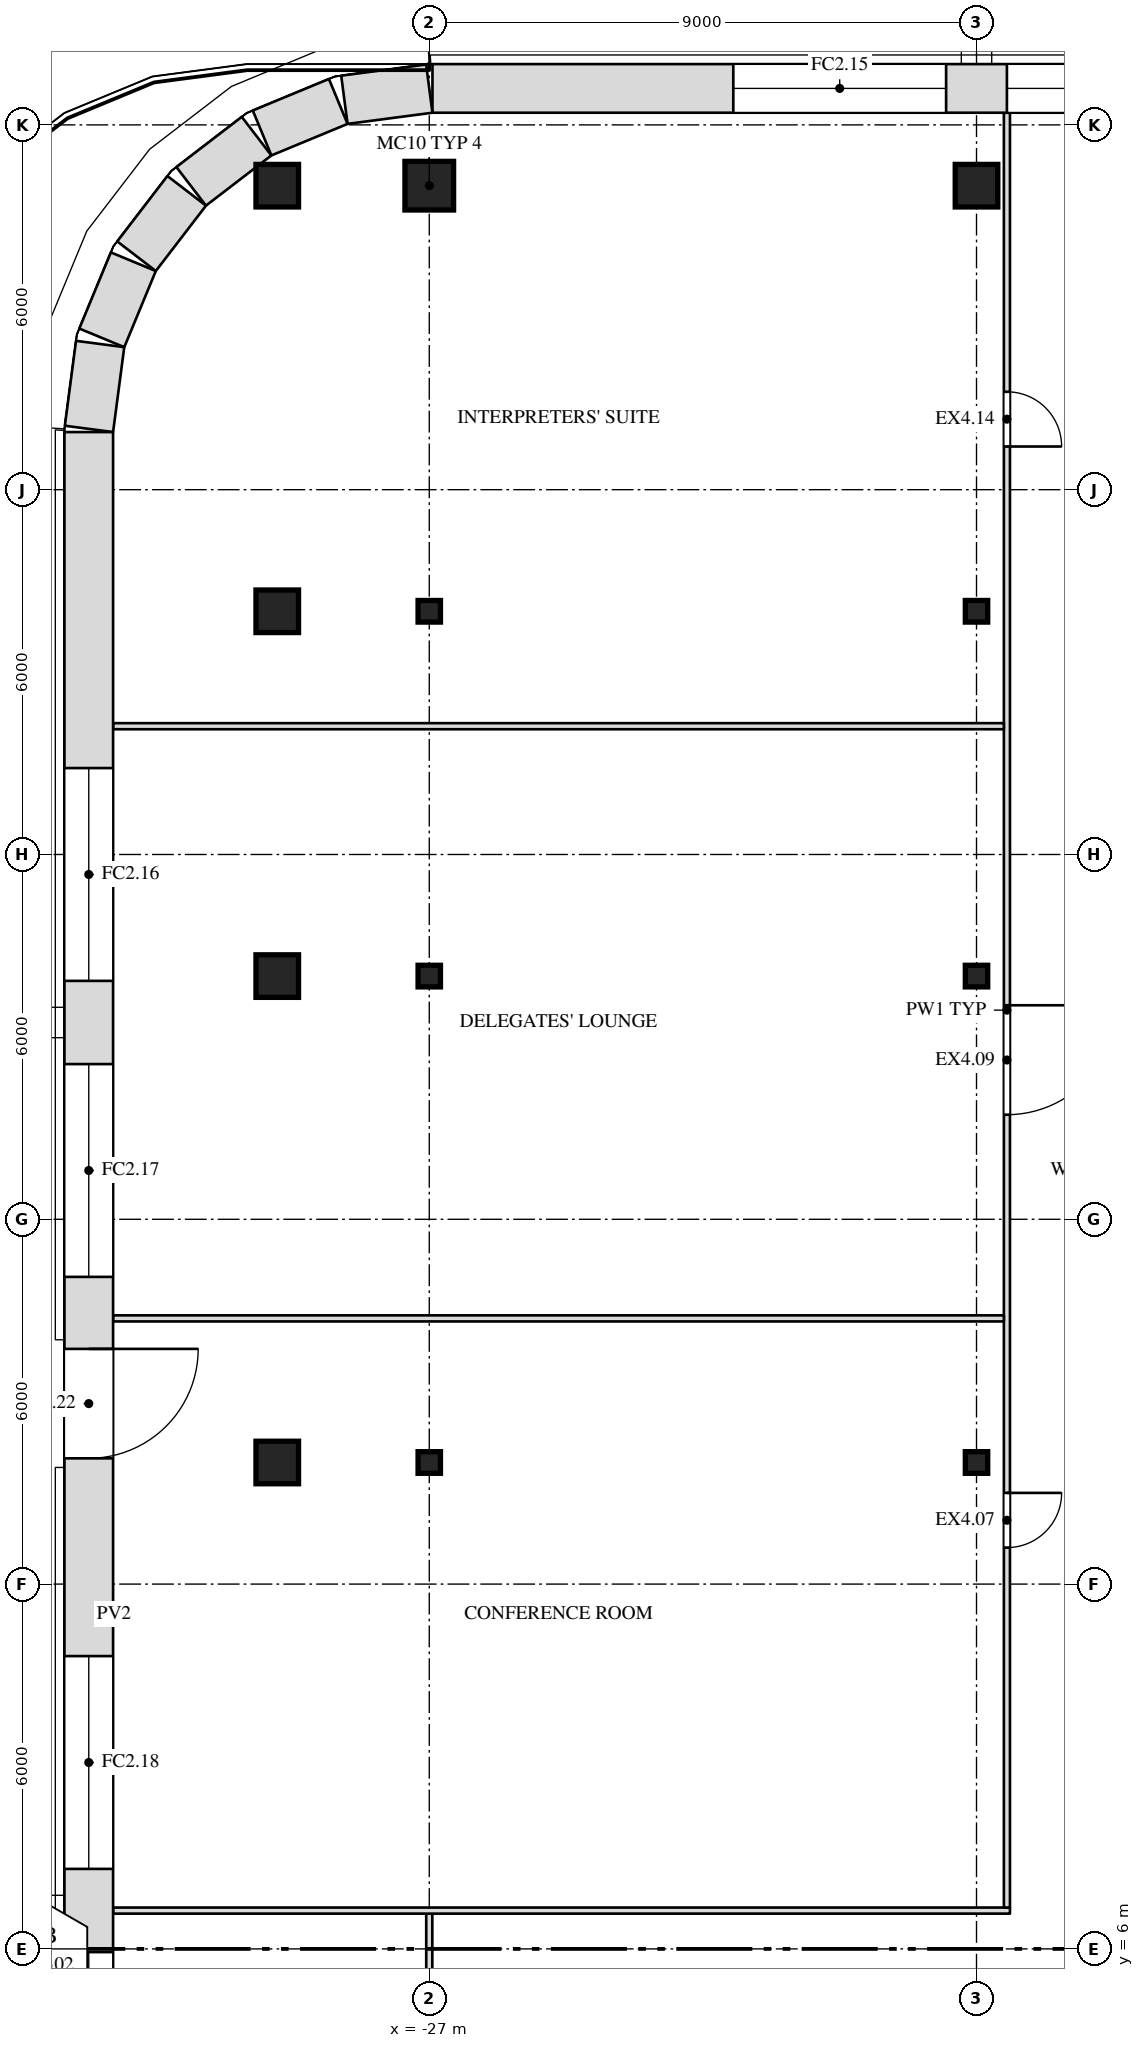
"""IFC4 building model, lengths in metres.
Left out: names, types, materials, properties, quantities, classifications, styles, units other than length and angle.
Written with IfcOpenShell. Run it as: python <this file> out.ifc"""

import sys

from ifc_helpers import new_model, si_unit, direction, frame, frame_2d, origin, origin_2d, place, context, subcontext, project, spatial, rectangle, i_section, extrude, element, fill, save


model = new_model("IFC4")
c1 = context("Model", 3, precision=1e-05, world=origin(), true_north=direction((0.0, 1.0)))
c2 = subcontext(c1, "Body", "Model", "MODEL_VIEW")
j1 = project(units=[si_unit("LENGTHUNIT", "METRE"), si_unit("PLANEANGLEUNIT", "RADIAN")], contexts=[c1])
p1 = place(None, origin())
s1 = spatial("IfcSite", under=j1, at=p1, CompositionType="ELEMENT")
p2 = place(p1, origin())
s2 = spatial("IfcBuilding", under=s1, at=p2, CompositionType="ELEMENT")
p3 = place(p2, frame((0.0, 0.0, 284.5)))
s3 = spatial("IfcBuildingStorey", under=s2, at=p3, CompositionType="ELEMENT", Elevation=284.5)
p4 = place(p3, frame((-29.5, 14.0, 0.0), z_axis=(0.0, 0.0, 1.0), x_axis=(1.0, 0.0, 0.0)))
e1 = element("IfcColumn", 1, at=p4, inside=s3, PredefinedType="COLUMN", context=c2, shape_type="SweptSolid", body=[
    extrude(rectangle(XDim=0.7, YDim=0.7, at=origin_2d()), origin(), (0.0, 0.0, 1.0), 4.0),
])
for number, where, z_axis, x_axis in (
    (2, (-27.0, 14.0, 0.0), (0.0, 0.0, 1.0), (1.0, 0.0, 0.0)),
    (3, (-18.0, 14.0, 0.0), (0.0, 0.0, 1.0), (1.0, 0.0, 0.0)),
):
    element("IfcColumn", number, at=place(p3, frame(where, z_axis=z_axis, x_axis=x_axis)), inside=s3, PredefinedType="COLUMN", context=c2, shape_type="SweptSolid", body=[
        extrude(i_section(OverallWidth=0.368, OverallDepth=0.356, WebThickness=0.011, FlangeThickness=0.018, at=origin_2d()), origin(), (0.0, 0.0, 1.0), 4.0),
    ])
p5 = place(p3, frame((-29.5, 22.0, 0.0), z_axis=(0.0, 0.0, 1.0), x_axis=(1.0, 0.0, 0.0)))
e4 = element("IfcColumn", 4, at=p5, inside=s3, PredefinedType="COLUMN", context=c2, shape_type="SweptSolid", body=[
    extrude(rectangle(XDim=0.7, YDim=0.7, at=origin_2d()), origin(), (0.0, 0.0, 1.0), 4.0),
])
for number, where, z_axis, x_axis in (
    (5, (-27.0, 22.0, 0.0), (0.0, 0.0, 1.0), (1.0, 0.0, 0.0)),
    (6, (-18.0, 22.0, 0.0), (0.0, 0.0, 1.0), (1.0, 0.0, 0.0)),
):
    element("IfcColumn", number, at=place(p3, frame(where, z_axis=z_axis, x_axis=x_axis)), inside=s3, PredefinedType="COLUMN", context=c2, shape_type="SweptSolid", body=[
        extrude(i_section(OverallWidth=0.368, OverallDepth=0.356, WebThickness=0.011, FlangeThickness=0.018, at=origin_2d()), origin(), (0.0, 0.0, 1.0), 4.0),
    ])
p6 = place(p3, frame((-29.5, 28.0, 0.0), z_axis=(0.0, 0.0, 1.0), x_axis=(1.0, 0.0, 0.0)))
e7 = element("IfcColumn", 7, at=p6, inside=s3, PredefinedType="COLUMN", context=c2, shape_type="SweptSolid", body=[
    extrude(rectangle(XDim=0.7, YDim=0.7, at=origin_2d()), origin(), (0.0, 0.0, 1.0), 4.0),
])
for number, where, z_axis, x_axis in (
    (8, (-27.0, 28.0, 0.0), (0.0, 0.0, 1.0), (1.0, 0.0, 0.0)),
    (9, (-18.0, 28.0, 0.0), (0.0, 0.0, 1.0), (1.0, 0.0, 0.0)),
):
    element("IfcColumn", number, at=place(p3, frame(where, z_axis=z_axis, x_axis=x_axis)), inside=s3, PredefinedType="COLUMN", context=c2, shape_type="SweptSolid", body=[
        extrude(i_section(OverallWidth=0.368, OverallDepth=0.356, WebThickness=0.011, FlangeThickness=0.018, at=origin_2d()), origin(), (0.0, 0.0, 1.0), 4.0),
    ])
p7 = place(p3, frame((-29.5, 35.0, 0.0), z_axis=(0.0, 0.0, 1.0), x_axis=(1.0, 0.0, 0.0)))
e10 = element("IfcColumn", 10, at=p7, inside=s3, PredefinedType="COLUMN", context=c2, shape_type="SweptSolid", body=[
    extrude(rectangle(XDim=0.7, YDim=0.7, at=origin_2d()), origin(), (0.0, 0.0, 1.0), 4.0),
])
p8 = place(p3, frame((-27.0, 35.0, 0.0), z_axis=(0.0, 0.0, 1.0), x_axis=(1.0, 0.0, 0.0)))
e11 = element("IfcColumn", 11, at=p8, inside=s3, PredefinedType="COLUMN", context=c2, shape_type="SweptSolid", body=[
    extrude(rectangle(XDim=0.8, YDim=0.8, at=origin_2d()), origin(), (0.0, 0.0, 1.0), 4.0),
])
p9 = place(p3, frame((-18.0, 35.0, 0.0), z_axis=(0.0, 0.0, 1.0), x_axis=(1.0, 0.0, 0.0)))
e12 = element("IfcColumn", 12, at=p9, inside=s3, PredefinedType="COLUMN", context=c2, shape_type="SweptSolid", body=[
    extrude(rectangle(XDim=0.7, YDim=0.7, at=origin_2d()), origin(), (0.0, 0.0, 1.0), 4.0),
])
p10 = place(p3, frame((-27.0, 4.678, 0.0), z_axis=(0.0, 0.0, 1.0), x_axis=(0.0, 1.0, 0.0)))
e13 = element("IfcWall", 13, at=p10, inside=s3, PredefinedType="PARTITIONING", context=c2, shape_type="SweptSolid", body=[
    extrude(rectangle(XDim=1.902, YDim=0.1, at=frame_2d((0.951, 0.0))), origin(), (0.0, 0.0, 1.0), 3.247),
])
p11 = place(p3, frame((-32.2, 6.63, 0.0), z_axis=(0.0, 0.0, 1.0), x_axis=(1.0, 0.0, 0.0)))
e14 = element("IfcWall", 14, at=p11, inside=s3, PredefinedType="PARTITIONING", context=c2, shape_type="SweptSolid", body=[
    extrude(rectangle(XDim=14.75, YDim=0.1, at=frame_2d((7.375, 0.0))), origin(), (0.0, 0.0, 1.0), 3.78),
])
p12 = place(p3, frame((-17.5, 6.68, 0.0), z_axis=(0.0, 0.0, 1.0), x_axis=(0.0, 1.0, 0.0)))
e15 = element("IfcWall", 15, at=p12, inside=s3, PredefinedType="PARTITIONING", context=c2, shape_type="SweptSolid", body=[
    extrude(rectangle(XDim=29.52, YDim=0.1, at=frame_2d((14.76, 0.0))), origin(), (0.0, 0.0, 1.0), 3.78),
])
p13 = place(p12, frame((5.92, 0.0, 0.0)))
e16 = element("IfcOpeningElement", 16, at=p13, cuts=e15, PredefinedType="OPENING", context=c2, shape_type="SweptSolid", body=[
    extrude(rectangle(XDim=0.9, YDim=2.1, at=frame_2d((0.45, 1.05))), frame((0.0, 0.062, 0.0), z_axis=(0.0, -1.0, 0.0), x_axis=(1.0, 0.0, 0.0)), (0.0, 0.0, 1.0), 0.124),
])
p14 = place(p12, frame((13.04, 0.0, 0.0)))
e17 = element("IfcOpeningElement", 17, at=p14, cuts=e15, PredefinedType="OPENING", context=c2, shape_type="SweptSolid", body=[
    extrude(rectangle(XDim=1.8, YDim=2.1, at=frame_2d((0.9, 1.05))), frame((0.0, 0.062, 0.0), z_axis=(0.0, -1.0, 0.0), x_axis=(1.0, 0.0, 0.0)), (0.0, 0.0, 1.0), 0.124),
])
p15 = place(p12, frame((24.03, 0.0, 0.0)))
e18 = element("IfcOpeningElement", 18, at=p15, cuts=e15, PredefinedType="OPENING", context=c2, shape_type="SweptSolid", body=[
    extrude(rectangle(XDim=0.9, YDim=2.1, at=frame_2d((0.45, 1.05))), frame((0.0, 0.062, 0.0), z_axis=(0.0, -1.0, 0.0), x_axis=(1.0, 0.0, 0.0)), (0.0, 0.0, 1.0), 0.124),
])
for number, where, z_axis, x_axis in (
    (19, (-32.2, 16.37, 0.0), (0.0, 0.0, 1.0), (1.0, 0.0, 0.0)),
    (20, (-32.2, 26.11, 0.0), (0.0, 0.0, 1.0), (1.0, 0.0, 0.0)),
):
    element("IfcWall", number, at=place(p3, frame(where, z_axis=z_axis, x_axis=x_axis)), inside=s3, PredefinedType="PARTITIONING", context=c2, shape_type="SweptSolid", body=[
        extrude(rectangle(XDim=14.65, YDim=0.1, at=frame_2d((7.325, 0.0))), origin(), (0.0, 0.0, 1.0), 3.78),
    ])
p16 = place(p3, frame((26.948, 36.6, 0.0), z_axis=(0.0, 0.0, 1.0), x_axis=(-1.0, 0.0, 0.0)))
e21 = element("IfcWall", 21, at=p16, inside=s3, PredefinedType="SOLIDWALL", context=c2, shape_type="SweptSolid", body=[
    extrude(rectangle(XDim=53.895, YDim=0.8, at=frame_2d((26.948, 0.0))), origin(), (0.0, 0.0, 1.0), 3.78),
])
p17 = place(p16, frame((4.948, 0.0, 1.0)))
e22 = element("IfcOpeningElement", 22, at=p17, cuts=e21, PredefinedType="OPENING", context=c2, shape_type="SweptSolid", body=[
    extrude(rectangle(XDim=3.5, YDim=2.5, at=frame_2d((1.75, 1.25))), frame((0.0, 0.412, 0.0), z_axis=(0.0, -1.0, 0.0), x_axis=(1.0, 0.0, 0.0)), (0.0, 0.0, 1.0), 0.824),
])
p18 = place(p16, frame((9.448, 0.0, 1.0)))
e23 = element("IfcOpeningElement", 23, at=p18, cuts=e21, PredefinedType="OPENING", context=c2, shape_type="SweptSolid", body=[
    extrude(rectangle(XDim=3.5, YDim=2.5, at=frame_2d((1.75, 1.25))), frame((0.0, 0.412, 0.0), z_axis=(0.0, -1.0, 0.0), x_axis=(1.0, 0.0, 0.0)), (0.0, 0.0, 1.0), 0.824),
])
p19 = place(p16, frame((13.948, 0.0, 1.0)))
e24 = element("IfcOpeningElement", 24, at=p19, cuts=e21, PredefinedType="OPENING", context=c2, shape_type="SweptSolid", body=[
    extrude(rectangle(XDim=3.5, YDim=2.5, at=frame_2d((1.75, 1.25))), frame((0.0, 0.412, 0.0), z_axis=(0.0, -1.0, 0.0), x_axis=(1.0, 0.0, 0.0)), (0.0, 0.0, 1.0), 0.824),
])
p20 = place(p16, frame((18.448, 0.0, 1.0)))
e25 = element("IfcOpeningElement", 25, at=p20, cuts=e21, PredefinedType="OPENING", context=c2, shape_type="SweptSolid", body=[
    extrude(rectangle(XDim=3.5, YDim=2.5, at=frame_2d((1.75, 1.25))), frame((0.0, 0.412, 0.0), z_axis=(0.0, -1.0, 0.0), x_axis=(1.0, 0.0, 0.0)), (0.0, 0.0, 1.0), 0.824),
])
p21 = place(p16, frame((22.948, 0.0, 1.0)))
e26 = element("IfcOpeningElement", 26, at=p21, cuts=e21, PredefinedType="OPENING", context=c2, shape_type="SweptSolid", body=[
    extrude(rectangle(XDim=3.5, YDim=2.5, at=frame_2d((1.75, 1.25))), frame((0.0, 0.412, 0.0), z_axis=(0.0, -1.0, 0.0), x_axis=(1.0, 0.0, 0.0)), (0.0, 0.0, 1.0), 0.824),
])
p22 = place(p16, frame((27.448, 0.0, 1.0)))
e27 = element("IfcOpeningElement", 27, at=p22, cuts=e21, PredefinedType="OPENING", context=c2, shape_type="SweptSolid", body=[
    extrude(rectangle(XDim=3.5, YDim=2.5, at=frame_2d((1.75, 1.25))), frame((0.0, 0.412, 0.0), z_axis=(0.0, -1.0, 0.0), x_axis=(1.0, 0.0, 0.0)), (0.0, 0.0, 1.0), 0.824),
])
p23 = place(p16, frame((31.948, 0.0, 1.0)))
e28 = element("IfcOpeningElement", 28, at=p23, cuts=e21, PredefinedType="OPENING", context=c2, shape_type="SweptSolid", body=[
    extrude(rectangle(XDim=3.5, YDim=2.5, at=frame_2d((1.75, 1.25))), frame((0.0, 0.412, 0.0), z_axis=(0.0, -1.0, 0.0), x_axis=(1.0, 0.0, 0.0)), (0.0, 0.0, 1.0), 0.824),
])
p24 = place(p16, frame((36.448, 0.0, 1.0)))
e29 = element("IfcOpeningElement", 29, at=p24, cuts=e21, PredefinedType="OPENING", context=c2, shape_type="SweptSolid", body=[
    extrude(rectangle(XDim=3.5, YDim=2.5, at=frame_2d((1.75, 1.25))), frame((0.0, 0.412, 0.0), z_axis=(0.0, -1.0, 0.0), x_axis=(1.0, 0.0, 0.0)), (0.0, 0.0, 1.0), 0.824),
])
p25 = place(p16, frame((40.948, 0.0, 1.0)))
e30 = element("IfcOpeningElement", 30, at=p25, cuts=e21, PredefinedType="OPENING", context=c2, shape_type="SweptSolid", body=[
    extrude(rectangle(XDim=3.5, YDim=2.5, at=frame_2d((1.75, 1.25))), frame((0.0, 0.412, 0.0), z_axis=(0.0, -1.0, 0.0), x_axis=(1.0, 0.0, 0.0)), (0.0, 0.0, 1.0), 0.824),
])
p26 = place(p16, frame((45.448, 0.0, 1.0)))
e31 = element("IfcOpeningElement", 31, at=p26, cuts=e21, PredefinedType="OPENING", context=c2, shape_type="SweptSolid", body=[
    extrude(rectangle(XDim=3.5, YDim=2.5, at=frame_2d((1.75, 1.25))), frame((0.0, 0.412, 0.0), z_axis=(0.0, -1.0, 0.0), x_axis=(1.0, 0.0, 0.0)), (0.0, 0.0, 1.0), 0.824),
])
p27 = place(p3, frame((-27.0, 36.597, 0.0), z_axis=(0.0, 0.0, 1.0), x_axis=(-0.99144603414, -0.130517283865, 0.0)))
e32 = element("IfcWall", 32, at=p27, inside=s3, PredefinedType="SOLIDWALL", context=c2, shape_type="SweptSolid", body=[
    extrude(rectangle(XDim=1.408, YDim=0.8, at=frame_2d((0.704, 0.0))), origin(), (0.0, 0.0, 1.0), 3.78),
])
p28 = place(p3, frame((-28.497, 36.386, 0.0), z_axis=(0.0, 0.0, 1.0), x_axis=(-0.923847774587, -0.38276009378, 0.0)))
e33 = element("IfcWall", 33, at=p28, inside=s3, PredefinedType="SOLIDWALL", context=c2, shape_type="SweptSolid", body=[
    extrude(rectangle(XDim=1.355, YDim=0.8, at=frame_2d((0.678, 0.0))), origin(), (0.0, 0.0, 1.0), 3.78),
])
for number, where, z_axis, x_axis in (
    (34, (-29.84, 35.815, 0.0), (0.0, 0.0, 1.0), (-0.793, -0.609, 0.0)),
    (35, (-30.989, 34.916, 0.0), (0.0, 0.0, 1.0), (-0.609, -0.793, 0.0)),
):
    element("IfcWall", number, at=place(p3, frame(where, z_axis=z_axis, x_axis=x_axis)), inside=s3, PredefinedType="SOLIDWALL", context=c2, shape_type="SweptSolid", body=[
        extrude(rectangle(XDim=1.356, YDim=0.8, at=frame_2d((0.678, 0.0))), origin(), (0.0, 0.0, 1.0), 3.78),
    ])
p29 = place(p3, frame((-31.867, 33.75, 0.0), z_axis=(0.0, 0.0, 1.0), x_axis=(-0.38276009378, -0.923847774587, 0.0)))
e36 = element("IfcWall", 36, at=p29, inside=s3, PredefinedType="SOLIDWALL", context=c2, shape_type="SweptSolid", body=[
    extrude(rectangle(XDim=1.355, YDim=0.8, at=frame_2d((0.678, 0.0))), origin(), (0.0, 0.0, 1.0), 3.78),
])
p30 = place(p3, frame((-32.413, 32.396, 0.0), z_axis=(0.0, 0.0, 1.0), x_axis=(-0.130517283865, -0.99144603414, 0.0)))
e37 = element("IfcWall", 37, at=p30, inside=s3, PredefinedType="SOLIDWALL", context=c2, shape_type="SweptSolid", body=[
    extrude(rectangle(XDim=1.408, YDim=0.8, at=frame_2d((0.704, 0.0))), origin(), (0.0, 0.0, 1.0), 3.78),
])
p31 = place(p3, frame((-32.6, 30.948, 0.0), z_axis=(0.0, 0.0, 1.0), x_axis=(0.0, -1.0, 0.0)))
e38 = element("IfcWall", 38, at=p31, inside=s3, PredefinedType="SOLIDWALL", context=c2, shape_type="SweptSolid", body=[
    extrude(rectangle(XDim=38.895, YDim=0.8, at=frame_2d((19.448, 0.0))), origin(), (0.0, 0.0, 1.0), 3.78),
])
p32 = place(p31, frame((5.526, 0.0, 1.0)))
e39 = element("IfcOpeningElement", 39, at=p32, cuts=e38, PredefinedType="OPENING", context=c2, shape_type="SweptSolid", body=[
    extrude(rectangle(XDim=3.5, YDim=2.5, at=frame_2d((1.75, 1.25))), frame((0.0, 0.412, 0.0), z_axis=(0.0, -1.0, 0.0), x_axis=(1.0, 0.0, 0.0)), (0.0, 0.0, 1.0), 0.824),
])
p33 = place(p31, frame((10.395, 0.0, 1.0)))
e40 = element("IfcOpeningElement", 40, at=p33, cuts=e38, PredefinedType="OPENING", context=c2, shape_type="SweptSolid", body=[
    extrude(rectangle(XDim=3.5, YDim=2.5, at=frame_2d((1.75, 1.25))), frame((0.0, 0.412, 0.0), z_axis=(0.0, -1.0, 0.0), x_axis=(1.0, 0.0, 0.0)), (0.0, 0.0, 1.0), 0.824),
])
p34 = place(p31, frame((20.132, 0.0, 1.0)))
e41 = element("IfcOpeningElement", 41, at=p34, cuts=e38, PredefinedType="OPENING", context=c2, shape_type="SweptSolid", body=[
    extrude(rectangle(XDim=3.5, YDim=2.5, at=frame_2d((1.75, 1.25))), frame((0.0, 0.412, 0.0), z_axis=(0.0, -1.0, 0.0), x_axis=(1.0, 0.0, 0.0)), (0.0, 0.0, 1.0), 0.824),
])
p35 = place(p31, frame((25.0, 0.0, 1.0)))
e42 = element("IfcOpeningElement", 42, at=p35, cuts=e38, PredefinedType="OPENING", context=c2, shape_type="SweptSolid", body=[
    extrude(rectangle(XDim=3.5, YDim=2.5, at=frame_2d((1.75, 1.25))), frame((0.0, 0.412, 0.0), z_axis=(0.0, -1.0, 0.0), x_axis=(1.0, 0.0, 0.0)), (0.0, 0.0, 1.0), 0.824),
])
p36 = place(p31, frame((29.869, 0.0, 1.0)))
e43 = element("IfcOpeningElement", 43, at=p36, cuts=e38, PredefinedType="OPENING", context=c2, shape_type="SweptSolid", body=[
    extrude(rectangle(XDim=3.5, YDim=2.5, at=frame_2d((1.75, 1.25))), frame((0.0, 0.412, 0.0), z_axis=(0.0, -1.0, 0.0), x_axis=(1.0, 0.0, 0.0)), (0.0, 0.0, 1.0), 0.824),
])
p37 = place(p31, frame((15.079, 0.0, 0.0)))
e44 = element("IfcOpeningElement", 44, at=p37, cuts=e38, PredefinedType="OPENING", context=c2, shape_type="SweptSolid", body=[
    extrude(rectangle(XDim=1.8, YDim=2.4, at=frame_2d((0.9, 1.2))), frame((0.0, 0.412, 0.0), z_axis=(0.0, -1.0, 0.0), x_axis=(1.0, 0.0, 0.0)), (0.0, 0.0, 1.0), 0.824),
])
p38 = place(p13, origin())
e45 = element("IfcDoor", 45, at=p38, inside=s3, OperationType="SINGLE_SWING_LEFT", PredefinedType="DOOR", context=c2, shape_type="SweptSolid", body=[
    extrude(rectangle(XDim=0.9, YDim=2.1, at=frame_2d((0.45, 1.05))), frame((0.0, 0.025, 0.0), z_axis=(0.0, -1.0, 0.0), x_axis=(1.0, 0.0, 0.0)), (0.0, 0.0, 1.0), 0.05),
])
fill(e16, e45)
p39 = place(p14, origin())
e46 = element("IfcDoor", 46, at=p39, inside=s3, OperationType="DOUBLE_DOOR_SINGLE_SWING", PredefinedType="DOOR", context=c2, shape_type="SweptSolid", body=[
    extrude(rectangle(XDim=1.8, YDim=2.1, at=frame_2d((0.9, 1.05))), frame((0.0, 0.025, 0.0), z_axis=(0.0, -1.0, 0.0), x_axis=(1.0, 0.0, 0.0)), (0.0, 0.0, 1.0), 0.05),
])
fill(e17, e46)
p40 = place(p15, origin())
e47 = element("IfcDoor", 47, at=p40, inside=s3, OperationType="SINGLE_SWING_RIGHT", PredefinedType="DOOR", context=c2, shape_type="SweptSolid", body=[
    extrude(rectangle(XDim=0.9, YDim=2.1, at=frame_2d((0.45, 1.05))), frame((0.0, 0.025, 0.0), z_axis=(0.0, -1.0, 0.0), x_axis=(1.0, 0.0, 0.0)), (0.0, 0.0, 1.0), 0.05),
])
fill(e18, e47)
p41 = place(p25, origin())
e48 = element("IfcWindow", 48, at=p41, inside=s3, PartitioningType="SINGLE_PANEL", PredefinedType="WINDOW", context=c2, shape_type="SweptSolid", body=[
    extrude(rectangle(XDim=3.5, YDim=2.5, at=frame_2d((1.75, 1.25))), frame((0.0, 0.03, 0.0), z_axis=(0.0, -1.0, 0.0), x_axis=(1.0, 0.0, 0.0)), (0.0, 0.0, 1.0), 0.06),
])
fill(e30, e48)
p42 = place(p26, origin())
e49 = element("IfcWindow", 49, at=p42, inside=s3, PartitioningType="SINGLE_PANEL", PredefinedType="WINDOW", context=c2, shape_type="SweptSolid", body=[
    extrude(rectangle(XDim=3.5, YDim=2.5, at=frame_2d((1.75, 1.25))), frame((0.0, 0.03, 0.0), z_axis=(0.0, -1.0, 0.0), x_axis=(1.0, 0.0, 0.0)), (0.0, 0.0, 1.0), 0.06),
])
fill(e31, e49)
p43 = place(p32, origin())
e50 = element("IfcWindow", 50, at=p43, inside=s3, PartitioningType="SINGLE_PANEL", PredefinedType="WINDOW", context=c2, shape_type="SweptSolid", body=[
    extrude(rectangle(XDim=3.5, YDim=2.5, at=frame_2d((1.75, 1.25))), frame((0.0, 0.03, 0.0), z_axis=(0.0, -1.0, 0.0), x_axis=(1.0, 0.0, 0.0)), (0.0, 0.0, 1.0), 0.06),
])
fill(e39, e50)
p44 = place(p33, origin())
e51 = element("IfcWindow", 51, at=p44, inside=s3, PartitioningType="SINGLE_PANEL", PredefinedType="WINDOW", context=c2, shape_type="SweptSolid", body=[
    extrude(rectangle(XDim=3.5, YDim=2.5, at=frame_2d((1.75, 1.25))), frame((0.0, 0.03, 0.0), z_axis=(0.0, -1.0, 0.0), x_axis=(1.0, 0.0, 0.0)), (0.0, 0.0, 1.0), 0.06),
])
fill(e40, e51)
p45 = place(p34, origin())
e52 = element("IfcWindow", 52, at=p45, inside=s3, PartitioningType="SINGLE_PANEL", PredefinedType="WINDOW", context=c2, shape_type="SweptSolid", body=[
    extrude(rectangle(XDim=3.5, YDim=2.5, at=frame_2d((1.75, 1.25))), frame((0.0, 0.03, 0.0), z_axis=(0.0, -1.0, 0.0), x_axis=(1.0, 0.0, 0.0)), (0.0, 0.0, 1.0), 0.06),
])
fill(e41, e52)
p46 = place(p35, origin())
e53 = element("IfcWindow", 53, at=p46, inside=s3, PartitioningType="SINGLE_PANEL", PredefinedType="WINDOW", context=c2, shape_type="SweptSolid", body=[
    extrude(rectangle(XDim=3.5, YDim=2.5, at=frame_2d((1.75, 1.25))), frame((0.0, 0.03, 0.0), z_axis=(0.0, -1.0, 0.0), x_axis=(1.0, 0.0, 0.0)), (0.0, 0.0, 1.0), 0.06),
])
fill(e42, e53)
p47 = place(p37, origin())
e54 = element("IfcDoor", 54, at=p47, inside=s3, OperationType="DOUBLE_DOOR_SINGLE_SWING", PredefinedType="DOOR", context=c2, shape_type="SweptSolid", body=[
    extrude(rectangle(XDim=1.8, YDim=2.4, at=frame_2d((0.9, 1.2))), frame((0.0, 0.025, 0.0), z_axis=(0.0, -1.0, 0.0), x_axis=(1.0, 0.0, 0.0)), (0.0, 0.0, 1.0), 0.05),
])
fill(e44, e54)
save(model, sys.argv[1])
